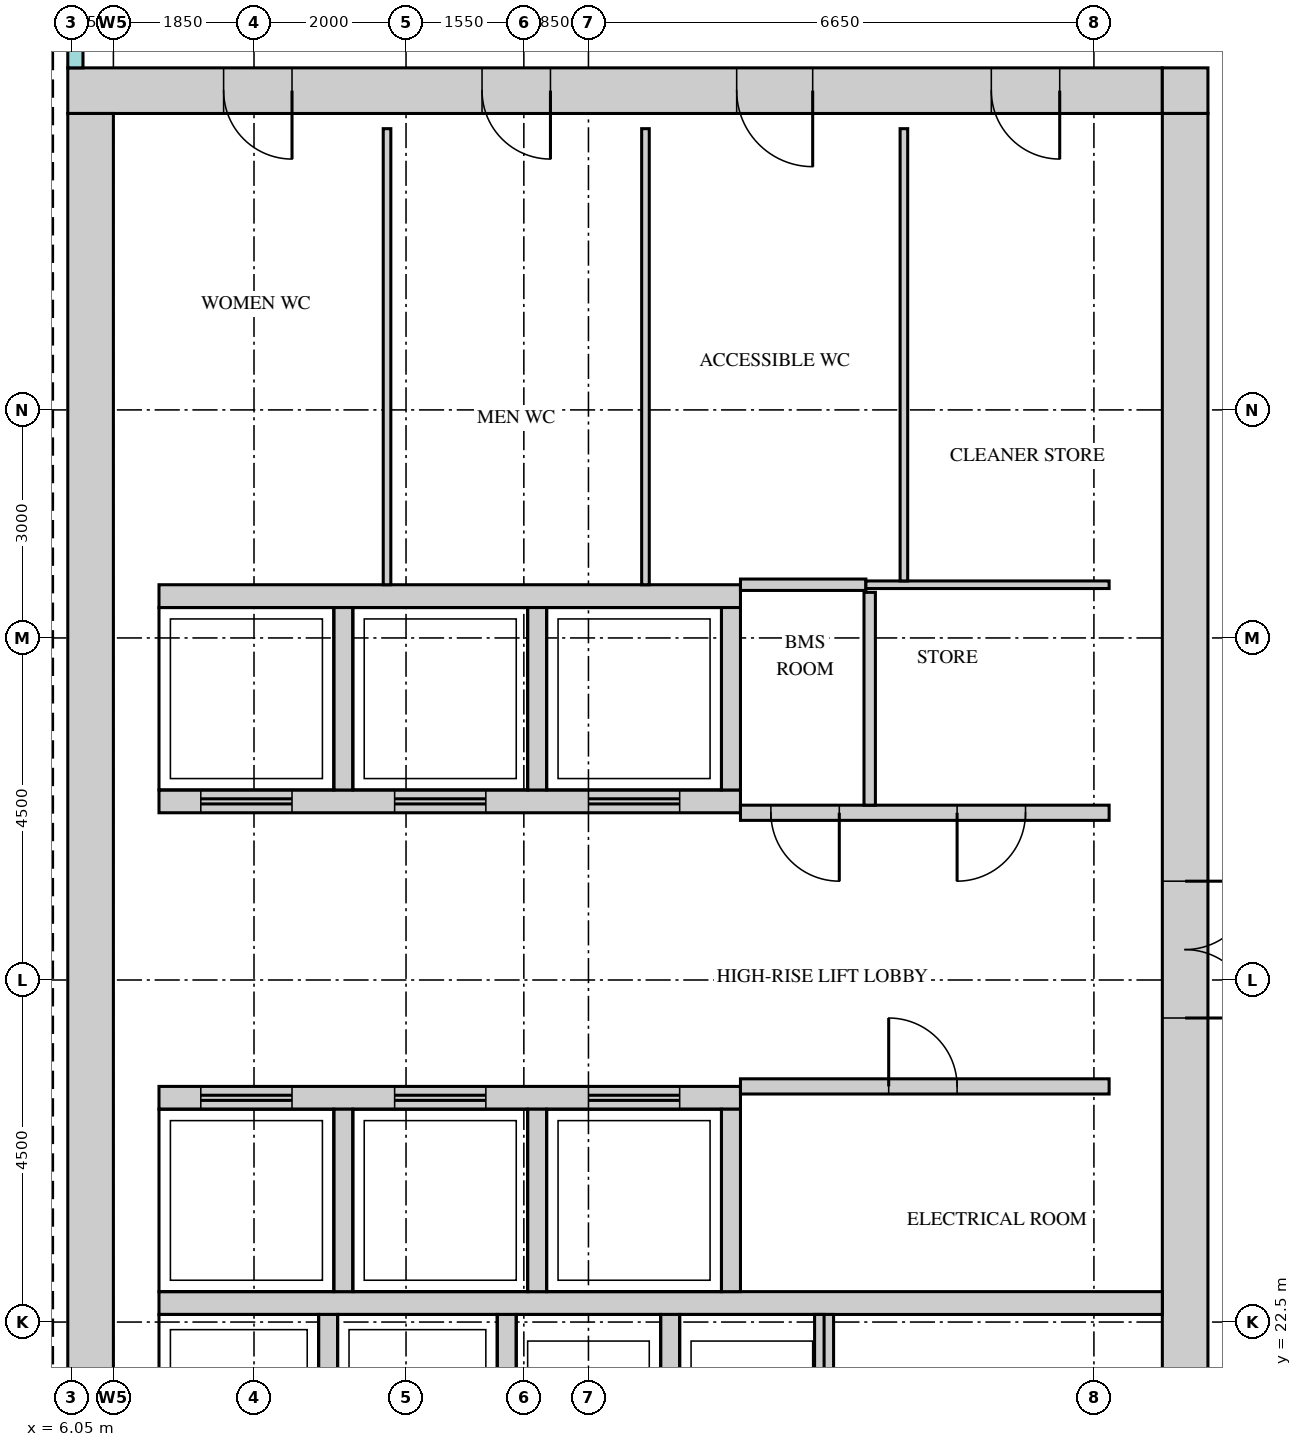
"""IFC4 building model, lengths in metres.
Left out: names, types, materials, properties, quantities, classifications, styles, units other than length and angle.
Written with IfcOpenShell. Run it as: python <this file> out.ifc"""

import sys

from ifc_helpers import new_model, si_unit, direction, frame, frame_2d, origin, place, context, subcontext, project, spatial, rectangle, extrude, source, transform, mapped, element, fill, save


model = new_model("IFC4")
c1 = context("Model", 3, precision=1e-05, world=origin(), true_north=direction((0.0, 1.0)))
c2 = subcontext(c1, "Body", "Model", "MODEL_VIEW")
j1 = project(units=[si_unit("LENGTHUNIT", "METRE"), si_unit("PLANEANGLEUNIT", "RADIAN")], contexts=[c1])
p1 = place(None, origin())
s1 = spatial("IfcSite", under=j1, at=p1, CompositionType="ELEMENT")
p2 = place(p1, origin())
s2 = spatial("IfcBuilding", under=s1, at=p2, CompositionType="ELEMENT")
p3 = place(p2, frame((0.0, 0.0, 326.2)))
s3 = spatial("IfcBuildingStorey", under=s2, at=p3, CompositionType="ELEMENT", Elevation=326.2)
m1 = source(origin(), c2, "Body", "SweptSolid", [
    extrude(rectangle(XDim=14.4, YDim=0.6, at=frame_2d((7.2, 0.0))), origin(), (0.0, 0.0, 1.0), 3.75),
])
p4 = place(p3, frame((6.0, 38.7, 0.0), z_axis=(0.0, 0.0, 1.0), x_axis=(1.0, 0.0, 0.0)))
e1 = element("IfcWall", 1, at=p4, inside=s3, PredefinedType="SHEAR", context=c2, shape_type="MappedRepresentation", body=[
    mapped(m1, transform((0.0, 0.0, 0.0))),
])
m2 = source(origin(), c2, "Body", "SweptSolid", [
    extrude(rectangle(XDim=0.9, YDim=2.1, at=frame_2d((0.45, 1.05))), frame((0.0, 0.31, 0.0), z_axis=(0.0, -1.0, 0.0), x_axis=(1.0, 0.0, 0.0)), (0.0, 0.0, 1.0), 0.62),
])
p5 = place(p4, frame((2.05, 0.0, 0.0)))
e2 = element("IfcOpeningElement", 2, at=p5, cuts=e1, PredefinedType="OPENING", context=c2, shape_type="MappedRepresentation", body=[
    mapped(m2, transform((0.0, 0.0, 0.0))),
])
p6 = place(p4, frame((5.45, 0.0, 0.0)))
e3 = element("IfcOpeningElement", 3, at=p6, cuts=e1, PredefinedType="OPENING", context=c2, shape_type="MappedRepresentation", body=[
    mapped(m2, transform((0.0, 0.0, 0.0))),
])
m3 = source(origin(), c2, "Body", "SweptSolid", [
    extrude(rectangle(XDim=1.0, YDim=2.1, at=frame_2d((0.5, 1.05))), frame((0.0, 0.31, 0.0), z_axis=(0.0, -1.0, 0.0), x_axis=(1.0, 0.0, 0.0)), (0.0, 0.0, 1.0), 0.62),
])
p7 = place(p4, frame((8.8, 0.0, 0.0)))
e4 = element("IfcOpeningElement", 4, at=p7, cuts=e1, PredefinedType="OPENING", context=c2, shape_type="MappedRepresentation", body=[
    mapped(m3, transform((0.0, 0.0, 0.0))),
])
p8 = place(p4, frame((12.15, 0.0, 0.0)))
e5 = element("IfcOpeningElement", 5, at=p8, cuts=e1, PredefinedType="OPENING", context=c2, shape_type="MappedRepresentation", body=[
    mapped(m2, transform((0.0, 0.0, 0.0))),
])
m4 = source(origin(), c2, "Body", "SweptSolid", [
    extrude(rectangle(XDim=0.6, YDim=0.6, at=frame_2d((0.3, 0.0))), origin(), (0.0, 0.0, 1.0), 3.75),
])
p9 = place(p3, frame((20.4, 38.7, 0.0), z_axis=(0.0, 0.0, 1.0), x_axis=(1.0, 0.0, 0.0)))
e6 = element("IfcWall", 6, at=p9, inside=s3, PredefinedType="SHEAR", context=c2, shape_type="MappedRepresentation", body=[
    mapped(m4, transform((0.0, 0.0, 0.0))),
])
m5 = source(origin(), c2, "Body", "SweptSolid", [
    extrude(rectangle(XDim=22.8, YDim=0.6, at=frame_2d((11.4, 0.0))), origin(), (0.0, 0.0, 1.0), 3.75),
])
p10 = place(p3, frame((20.7, 15.6, 0.0), z_axis=(0.0, 0.0, 1.0), x_axis=(0.0, 1.0, 0.0)))
e7 = element("IfcWall", 7, at=p10, inside=s3, PredefinedType="SHEAR", context=c2, shape_type="MappedRepresentation", body=[
    mapped(m5, transform((0.0, 0.0, 0.0))),
])
m6 = source(origin(), c2, "Body", "SweptSolid", [
    extrude(rectangle(XDim=1.8, YDim=2.1, at=frame_2d((0.9, 1.05))), frame((0.0, 0.31, 0.0), z_axis=(0.0, -1.0, 0.0), x_axis=(1.0, 0.0, 0.0)), (0.0, 0.0, 1.0), 0.62),
])
p11 = place(p10, frame((10.9, 0.0, 0.0)))
e8 = element("IfcOpeningElement", 8, at=p11, cuts=e7, PredefinedType="OPENING", context=c2, shape_type="MappedRepresentation", body=[
    mapped(m6, transform((0.0, 0.0, 0.0))),
])
p12 = place(p10, frame((0.55, 0.0, 0.0)))
e9 = element("IfcOpeningElement", 9, at=p12, cuts=e7, PredefinedType="OPENING", context=c2, shape_type="MappedRepresentation", body=[
    mapped(m2, transform((0.0, 0.0, 0.0))),
])
p13 = place(p10, frame((4.1, 0.0, 0.0)))
e10 = element("IfcOpeningElement", 10, at=p13, cuts=e7, PredefinedType="OPENING", context=c2, shape_type="MappedRepresentation", body=[
    mapped(m2, transform((0.0, 0.0, 0.0))),
])
p14 = place(p3, frame((6.3, 15.6, 0.0), z_axis=(0.0, 0.0, 1.0), x_axis=(0.0, 1.0, 0.0)))
e11 = element("IfcWall", 11, at=p14, inside=s3, PredefinedType="SHEAR", context=c2, shape_type="MappedRepresentation", body=[
    mapped(m5, transform((0.0, 0.0, 0.0))),
])
m7 = source(origin(), c2, "Body", "SweptSolid", [
    extrude(rectangle(XDim=13.2, YDim=0.3, at=frame_2d((6.6, 0.0))), origin(), (0.0, 0.0, 1.0), 3.75),
])
p15 = place(p3, frame((7.2, 22.75, 0.0), z_axis=(0.0, 0.0, 1.0), x_axis=(1.0, 0.0, 0.0)))
e12 = element("IfcWall", 12, at=p15, inside=s3, PredefinedType="STANDARD", context=c2, shape_type="MappedRepresentation", body=[
    mapped(m7, transform((0.0, 0.0, 0.0))),
])
m8 = source(origin(), c2, "Body", "SweptSolid", [
    extrude(rectangle(XDim=7.65, YDim=0.3, at=frame_2d((3.825, 0.0))), origin(), (0.0, 0.0, 1.0), 3.75),
])
p16 = place(p3, frame((7.2, 32.05, 0.0), z_axis=(0.0, 0.0, 1.0), x_axis=(1.0, 0.0, 0.0)))
e13 = element("IfcWall", 13, at=p16, inside=s3, PredefinedType="STANDARD", context=c2, shape_type="MappedRepresentation", body=[
    mapped(m8, transform((0.0, 0.0, 0.0))),
])
p17 = place(p3, frame((7.2, 29.35, 0.0), z_axis=(0.0, 0.0, 1.0), x_axis=(1.0, 0.0, 0.0)))
e14 = element("IfcWall", 14, at=p17, inside=s3, PredefinedType="STANDARD", context=c2, shape_type="MappedRepresentation", body=[
    mapped(m8, transform((0.0, 0.0, 0.0))),
])
m9 = source(origin(), c2, "Body", "SweptSolid", [
    extrude(rectangle(XDim=1.2, YDim=2.1, at=frame_2d((0.6, 1.05))), frame((0.0, 0.16, 0.0), z_axis=(0.0, -1.0, 0.0), x_axis=(1.0, 0.0, 0.0)), (0.0, 0.0, 1.0), 0.32),
])
p18 = place(p17, frame((0.55, 0.0, 0.0)))
e15 = element("IfcOpeningElement", 15, at=p18, cuts=e14, PredefinedType="OPENING", context=c2, shape_type="MappedRepresentation", body=[
    mapped(m9, transform((0.0, 0.0, 0.0))),
])
p19 = place(p17, frame((3.1, 0.0, 0.0)))
e16 = element("IfcOpeningElement", 16, at=p19, cuts=e14, PredefinedType="OPENING", context=c2, shape_type="MappedRepresentation", body=[
    mapped(m9, transform((0.0, 0.0, 0.0))),
])
p20 = place(p17, frame((5.65, 0.0, 0.0)))
e17 = element("IfcOpeningElement", 17, at=p20, cuts=e14, PredefinedType="OPENING", context=c2, shape_type="MappedRepresentation", body=[
    mapped(m9, transform((0.0, 0.0, 0.0))),
])
p21 = place(p3, frame((7.2, 25.45, 0.0), z_axis=(0.0, 0.0, 1.0), x_axis=(1.0, 0.0, 0.0)))
e18 = element("IfcWall", 18, at=p21, inside=s3, PredefinedType="STANDARD", context=c2, shape_type="MappedRepresentation", body=[
    mapped(m8, transform((0.0, 0.0, 0.0))),
])
p22 = place(p21, frame((0.55, 0.0, 0.0)))
e19 = element("IfcOpeningElement", 19, at=p22, cuts=e18, PredefinedType="OPENING", context=c2, shape_type="MappedRepresentation", body=[
    mapped(m9, transform((0.0, 0.0, 0.0))),
])
p23 = place(p21, frame((3.1, 0.0, 0.0)))
e20 = element("IfcOpeningElement", 20, at=p23, cuts=e18, PredefinedType="OPENING", context=c2, shape_type="MappedRepresentation", body=[
    mapped(m9, transform((0.0, 0.0, 0.0))),
])
p24 = place(p21, frame((5.65, 0.0, 0.0)))
e21 = element("IfcOpeningElement", 21, at=p24, cuts=e18, PredefinedType="OPENING", context=c2, shape_type="MappedRepresentation", body=[
    mapped(m9, transform((0.0, 0.0, 0.0))),
])
m10 = source(origin(), c2, "Body", "SweptSolid", [
    extrude(rectangle(XDim=3.1, YDim=0.25, at=frame_2d((1.55, 0.0))), origin(), (0.0, 0.0, 1.0), 3.75),
])
for number, where, z_axis, x_axis in (
    (22, (9.425, 19.5, 0.0), (0.0, 0.0, 1.0), (0.0, 1.0, 0.0)),
    (23, (11.775, 19.5, 0.0), (0.0, 0.0, 1.0), (0.0, 1.0, 0.0)),
    (24, (13.925, 19.5, 0.0), (0.0, 0.0, 1.0), (0.0, 1.0, 0.0)),
    (25, (15.95, 19.5, 0.0), (0.0, 0.0, 1.0), (0.0, 1.0, 0.0)),
):
    element("IfcWall", number, at=place(p3, frame(where, z_axis=z_axis, x_axis=x_axis)), inside=s3, PredefinedType="STANDARD", context=c2, shape_type="MappedRepresentation", body=[
        mapped(m10, transform((0.0, 0.0, 0.0))),
    ])
m11 = source(origin(), c2, "Body", "SweptSolid", [
    extrude(rectangle(XDim=2.4, YDim=0.25, at=frame_2d((1.2, 0.0))), origin(), (0.0, 0.0, 1.0), 3.75),
])
for number, where, z_axis, x_axis in (
    (26, (9.625, 29.5, 0.0), (0.0, 0.0, 1.0), (0.0, 1.0, 0.0)),
    (27, (12.175, 29.5, 0.0), (0.0, 0.0, 1.0), (0.0, 1.0, 0.0)),
    (28, (14.725, 29.5, 0.0), (0.0, 0.0, 1.0), (0.0, 1.0, 0.0)),
):
    element("IfcWall", number, at=place(p3, frame(where, z_axis=z_axis, x_axis=x_axis)), inside=s3, PredefinedType="STANDARD", context=c2, shape_type="MappedRepresentation", body=[
        mapped(m11, transform((0.0, 0.0, 0.0))),
    ])
m12 = source(origin(), c2, "Body", "SweptSolid", [
    extrude(rectangle(XDim=2.4, YDim=0.25, at=frame_2d((1.2, 0.0))), origin(), (0.0, 0.0, 1.0), 3.75),
])
for number, where, z_axis, x_axis in (
    (29, (9.625, 22.9, 0.0), (0.0, 0.0, 1.0), (0.0, 1.0, 0.0)),
    (30, (12.175, 22.9, 0.0), (0.0, 0.0, 1.0), (0.0, 1.0, 0.0)),
    (31, (14.725, 22.9, 0.0), (0.0, 0.0, 1.0), (0.0, 1.0, 0.0)),
):
    element("IfcWall", number, at=place(p3, frame(where, z_axis=z_axis, x_axis=x_axis)), inside=s3, PredefinedType="STANDARD", context=c2, shape_type="MappedRepresentation", body=[
        mapped(m12, transform((0.0, 0.0, 0.0))),
    ])
m13 = source(origin(), c2, "Body", "SweptSolid", [
    extrude(rectangle(XDim=4.85, YDim=0.2, at=frame_2d((2.425, 0.0))), origin(), (0.0, 0.0, 1.0), 3.8),
])
p25 = place(p3, frame((14.85, 25.6, 0.0), z_axis=(0.0, 0.0, 1.0), x_axis=(1.0, 0.0, 0.0)))
e32 = element("IfcWall", 32, at=p25, inside=s3, PredefinedType="PARTITIONING", context=c2, shape_type="MappedRepresentation", body=[
    mapped(m13, transform((0.0, 0.0, 0.0))),
])
m14 = source(origin(), c2, "Body", "SweptSolid", [
    extrude(rectangle(XDim=0.9, YDim=2.1, at=frame_2d((0.45, 1.05))), frame((0.0, 0.11, 0.0), z_axis=(0.0, -1.0, 0.0), x_axis=(1.0, 0.0, 0.0)), (0.0, 0.0, 1.0), 0.22),
])
p26 = place(p25, frame((1.95, 0.0, 0.0)))
e33 = element("IfcOpeningElement", 33, at=p26, cuts=e32, PredefinedType="OPENING", context=c2, shape_type="MappedRepresentation", body=[
    mapped(m14, transform((0.0, 0.0, 0.0))),
])
p27 = place(p3, frame((14.85, 29.2, 0.0), z_axis=(0.0, 0.0, 1.0), x_axis=(1.0, 0.0, 0.0)))
e34 = element("IfcWall", 34, at=p27, inside=s3, PredefinedType="PARTITIONING", context=c2, shape_type="MappedRepresentation", body=[
    mapped(m13, transform((0.0, 0.0, 0.0))),
])
p28 = place(p27, frame((0.4, 0.0, 0.0)))
e35 = element("IfcOpeningElement", 35, at=p28, cuts=e34, PredefinedType="OPENING", context=c2, shape_type="MappedRepresentation", body=[
    mapped(m14, transform((0.0, 0.0, 0.0))),
])
p29 = place(p27, frame((2.85, 0.0, 0.0)))
e36 = element("IfcOpeningElement", 36, at=p29, cuts=e34, PredefinedType="OPENING", context=c2, shape_type="MappedRepresentation", body=[
    mapped(m14, transform((0.0, 0.0, 0.0))),
])
m15 = source(origin(), c2, "Body", "SweptSolid", [
    extrude(rectangle(XDim=2.8, YDim=0.15, at=frame_2d((1.4, 0.0))), origin(), (0.0, 0.0, 1.0), 3.8),
])
p30 = place(p3, frame((16.55, 29.3, 0.0), z_axis=(0.0, 0.0, 1.0), x_axis=(0.0, 1.0, 0.0)))
e37 = element("IfcWall", 37, at=p30, inside=s3, PredefinedType="PARTITIONING", context=c2, shape_type="MappedRepresentation", body=[
    mapped(m15, transform((0.0, 0.0, 0.0))),
])
m16 = source(origin(), c2, "Body", "SweptSolid", [
    extrude(rectangle(XDim=6.0, YDim=0.1, at=frame_2d((3.0, 0.0))), origin(), (0.0, 0.0, 1.0), 3.8),
])
for number, where, z_axis, x_axis in (
    (38, (10.2, 32.2, 0.0), (0.0, 0.0, 1.0), (0.0, 1.0, 0.0)),
    (39, (13.6, 32.2, 0.0), (0.0, 0.0, 1.0), (0.0, 1.0, 0.0)),
):
    element("IfcWall", number, at=place(p3, frame(where, z_axis=z_axis, x_axis=x_axis)), inside=s3, PredefinedType="PARTITIONING", context=c2, shape_type="MappedRepresentation", body=[
        mapped(m16, transform((0.0, 0.0, 0.0))),
    ])
m17 = source(origin(), c2, "Body", "SweptSolid", [
    extrude(rectangle(XDim=1.65, YDim=0.15, at=frame_2d((0.825, 0.0))), origin(), (0.0, 0.0, 1.0), 3.8),
])
p31 = place(p3, frame((14.85, 32.2, 0.0), z_axis=(0.0, 0.0, 1.0), x_axis=(1.0, 0.0, 0.0)))
e40 = element("IfcWall", 40, at=p31, inside=s3, PredefinedType="PARTITIONING", context=c2, shape_type="MappedRepresentation", body=[
    mapped(m17, transform((0.0, 0.0, 0.0))),
])
m18 = source(origin(), c2, "Body", "SweptSolid", [
    extrude(rectangle(XDim=3.2, YDim=0.1, at=frame_2d((1.6, 0.0))), origin(), (0.0, 0.0, 1.0), 3.8),
])
p32 = place(p3, frame((16.5, 32.2, 0.0), z_axis=(0.0, 0.0, 1.0), x_axis=(1.0, 0.0, 0.0)))
e41 = element("IfcWall", 41, at=p32, inside=s3, PredefinedType="PARTITIONING", context=c2, shape_type="MappedRepresentation", body=[
    mapped(m18, transform((0.0, 0.0, 0.0))),
])
m19 = source(origin(), c2, "Body", "SweptSolid", [
    extrude(rectangle(XDim=5.95, YDim=0.1, at=frame_2d((2.975, 0.0))), origin(), (0.0, 0.0, 1.0), 3.8),
])
p33 = place(p3, frame((17.0, 32.25, 0.0), z_axis=(0.0, 0.0, 1.0), x_axis=(0.0, 1.0, 0.0)))
e42 = element("IfcWall", 42, at=p33, inside=s3, PredefinedType="PARTITIONING", context=c2, shape_type="MappedRepresentation", body=[
    mapped(m19, transform((0.0, 0.0, 0.0))),
])
m20 = source(origin(), c2, "Body", "SweptSolid", [
    extrude(rectangle(XDim=0.9, YDim=2.1, at=frame_2d((0.45, 1.05))), frame((0.0, 0.025, 0.0), z_axis=(0.0, -1.0, 0.0), x_axis=(1.0, 0.0, 0.0)), (0.0, 0.0, 1.0), 0.05),
])
p34 = place(p26, origin())
e43 = element("IfcDoor", 43, at=p34, inside=s3, OperationType="SINGLE_SWING_RIGHT", PredefinedType="DOOR", context=c2, shape_type="MappedRepresentation", body=[
    mapped(m20, transform((0.0, 0.0, 0.0))),
])
fill(e33, e43)
p35 = place(p28, origin())
e44 = element("IfcDoor", 44, at=p35, inside=s3, OperationType="SINGLE_SWING_RIGHT", PredefinedType="DOOR", context=c2, shape_type="MappedRepresentation", body=[
    mapped(m20, transform((0.0, 0.0, 0.0))),
])
fill(e35, e44)
p36 = place(p29, origin())
e45 = element("IfcDoor", 45, at=p36, inside=s3, OperationType="SINGLE_SWING_LEFT", PredefinedType="DOOR", context=c2, shape_type="MappedRepresentation", body=[
    mapped(m20, transform((0.0, 0.0, 0.0))),
])
fill(e36, e45)
m21 = source(origin(), c2, "Body", "SweptSolid", [
    extrude(rectangle(XDim=1.8, YDim=2.1, at=frame_2d((0.9, 1.05))), frame((0.0, 0.25, 0.0), z_axis=(0.0, -1.0, 0.0), x_axis=(1.0, 0.0, 0.0)), (0.0, 0.0, 1.0), 0.5),
])
p37 = place(p11, origin())
e46 = element("IfcDoor", 46, at=p37, inside=s3, OperationType="DOUBLE_DOOR_SINGLE_SWING", PredefinedType="DOOR", context=c2, shape_type="MappedRepresentation", body=[
    mapped(m21, transform((0.0, 0.0, 0.0))),
])
fill(e8, e46)
m22 = source(origin(), c2, "Body", "SweptSolid", [
    extrude(rectangle(XDim=0.9, YDim=2.1, at=frame_2d((0.45, 1.05))), frame((0.0, 0.25, 0.0), z_axis=(0.0, -1.0, 0.0), x_axis=(1.0, 0.0, 0.0)), (0.0, 0.0, 1.0), 0.5),
])
p38 = place(p5, origin())
e47 = element("IfcDoor", 47, at=p38, inside=s3, OperationType="SINGLE_SWING_RIGHT", PredefinedType="DOOR", context=c2, shape_type="MappedRepresentation", body=[
    mapped(m22, transform((0.0, 0.0, 0.0))),
])
fill(e2, e47)
p39 = place(p6, origin())
e48 = element("IfcDoor", 48, at=p39, inside=s3, OperationType="SINGLE_SWING_RIGHT", PredefinedType="DOOR", context=c2, shape_type="MappedRepresentation", body=[
    mapped(m22, transform((0.0, 0.0, 0.0))),
])
fill(e3, e48)
m23 = source(origin(), c2, "Body", "SweptSolid", [
    extrude(rectangle(XDim=1.0, YDim=2.1, at=frame_2d((0.5, 1.05))), frame((0.0, 0.25, 0.0), z_axis=(0.0, -1.0, 0.0), x_axis=(1.0, 0.0, 0.0)), (0.0, 0.0, 1.0), 0.5),
])
p40 = place(p7, origin())
e49 = element("IfcDoor", 49, at=p40, inside=s3, OperationType="SINGLE_SWING_RIGHT", PredefinedType="DOOR", context=c2, shape_type="MappedRepresentation", body=[
    mapped(m23, transform((0.0, 0.0, 0.0))),
])
fill(e4, e49)
p41 = place(p8, origin())
e50 = element("IfcDoor", 50, at=p41, inside=s3, OperationType="SINGLE_SWING_RIGHT", PredefinedType="DOOR", context=c2, shape_type="MappedRepresentation", body=[
    mapped(m22, transform((0.0, 0.0, 0.0))),
])
fill(e5, e50)
m24 = source(origin(), c2, "Body", "SweptSolid", [
    extrude(rectangle(XDim=1.2, YDim=2.1, at=frame_2d((0.6, 1.05))), frame((0.0, 0.025, 0.0), z_axis=(0.0, -1.0, 0.0), x_axis=(1.0, 0.0, 0.0)), (0.0, 0.0, 1.0), 0.05),
])
p42 = place(p22, origin())
e51 = element("IfcDoor", 51, at=p42, inside=s3, OperationType="DOUBLE_DOOR_SLIDING", PredefinedType="DOOR", context=c2, shape_type="MappedRepresentation", body=[
    mapped(m24, transform((0.0, 0.0, 0.0))),
])
fill(e19, e51)
p43 = place(p23, origin())
e52 = element("IfcDoor", 52, at=p43, inside=s3, OperationType="DOUBLE_DOOR_SLIDING", PredefinedType="DOOR", context=c2, shape_type="MappedRepresentation", body=[
    mapped(m24, transform((0.0, 0.0, 0.0))),
])
fill(e20, e52)
p44 = place(p24, origin())
e53 = element("IfcDoor", 53, at=p44, inside=s3, OperationType="DOUBLE_DOOR_SLIDING", PredefinedType="DOOR", context=c2, shape_type="MappedRepresentation", body=[
    mapped(m24, transform((0.0, 0.0, 0.0))),
])
fill(e21, e53)
p45 = place(p18, origin())
e54 = element("IfcDoor", 54, at=p45, inside=s3, OperationType="DOUBLE_DOOR_SLIDING", PredefinedType="DOOR", context=c2, shape_type="MappedRepresentation", body=[
    mapped(m24, transform((0.0, 0.0, 0.0))),
])
fill(e15, e54)
p46 = place(p19, origin())
e55 = element("IfcDoor", 55, at=p46, inside=s3, OperationType="DOUBLE_DOOR_SLIDING", PredefinedType="DOOR", context=c2, shape_type="MappedRepresentation", body=[
    mapped(m24, transform((0.0, 0.0, 0.0))),
])
fill(e16, e55)
p47 = place(p20, origin())
e56 = element("IfcDoor", 56, at=p47, inside=s3, OperationType="DOUBLE_DOOR_SLIDING", PredefinedType="DOOR", context=c2, shape_type="MappedRepresentation", body=[
    mapped(m24, transform((0.0, 0.0, 0.0))),
])
fill(e17, e56)
save(model, sys.argv[1])
